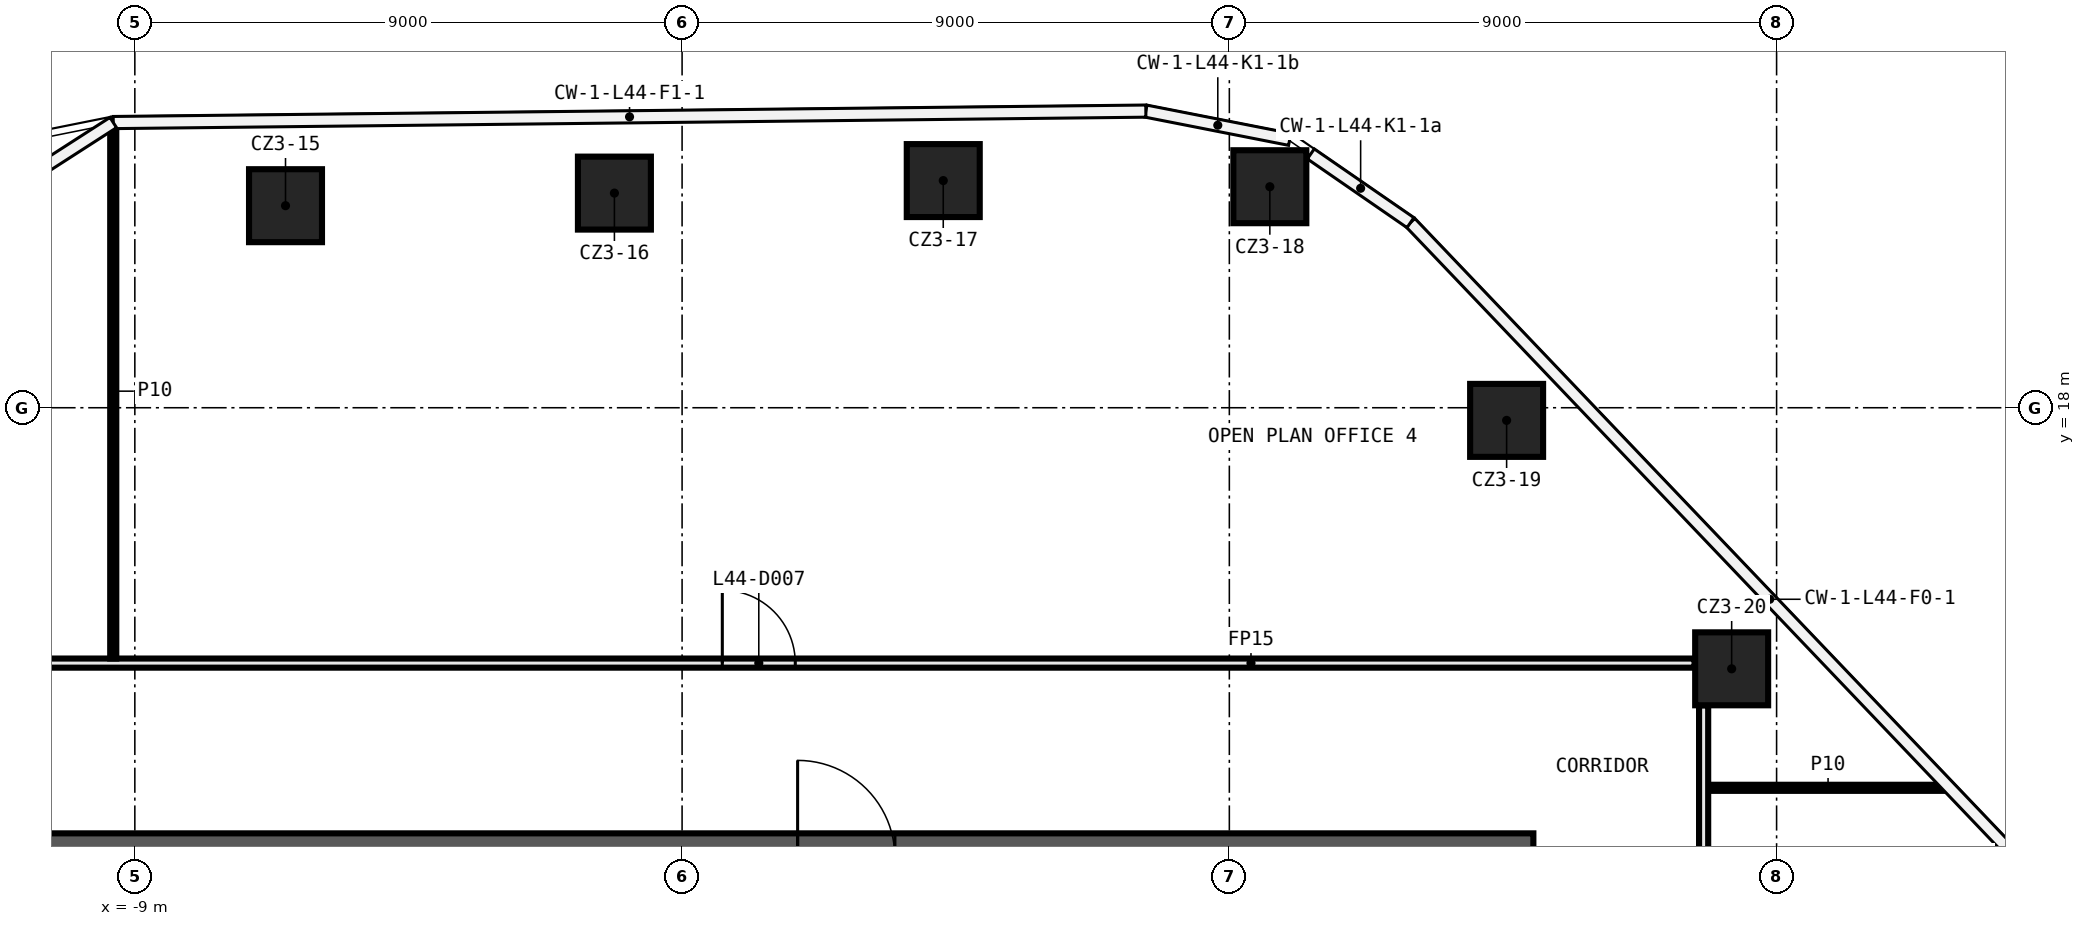
"""IFC4 building model, lengths in metres.
Left out: names, types, materials, properties, quantities, classifications, styles, units other than length and angle.
Written with IfcOpenShell. Run it as: python <this file> out.ifc"""

import sys

from ifc_helpers import new_model, si_unit, direction, frame, frame_2d, origin, origin_2d, place, context, subcontext, project, spatial, rectangle, extrude, element, fill, save


model = new_model("IFC4")
c1 = context("Model", 3, precision=1e-05, world=origin(), true_north=direction((0.0, 1.0)))
c2 = subcontext(c1, "Body", "Model", "MODEL_VIEW")
j1 = project(units=[si_unit("LENGTHUNIT", "METRE"), si_unit("PLANEANGLEUNIT", "RADIAN")], contexts=[c1])
p1 = place(None, origin())
s1 = spatial("IfcSite", under=j1, at=p1, CompositionType="ELEMENT")
p2 = place(p1, origin())
s2 = spatial("IfcBuilding", under=s1, at=p2, CompositionType="ELEMENT")
p3 = place(p2, frame((0.0, 0.0, 211.4)))
s3 = spatial("IfcBuildingStorey", under=s2, at=p3, CompositionType="ELEMENT", Elevation=211.4)
for number, where, z_axis, x_axis in (
    (1, (-6.522, 21.323, 0.0), (0.0, 0.0, 1.0), (1.0, 0.0, 0.0)),
    (2, (-1.113, 21.53, 0.0), (0.0, 0.0, 1.0), (1.0, 0.0, 0.0)),
    (3, (4.295, 21.736, 0.0), (0.0, 0.0, 1.0), (1.0, 0.0, 0.0)),
    (4, (9.666, 21.635, 0.0), (0.0, 0.0, 1.0), (1.0, 0.0, 0.0)),
    (5, (13.56, 17.792, 0.0), (0.0, 0.0, 1.0), (1.0, 0.0, 0.0)),
    (6, (17.261, 13.706, 0.0), (0.0, 0.0, 1.0), (1.0, 0.0, 0.0)),
):
    element("IfcColumn", number, at=place(p3, frame(where, z_axis=z_axis, x_axis=x_axis)), inside=s3, PredefinedType="COLUMN", context=c2, shape_type="SweptSolid", body=[
        extrude(rectangle(XDim=1.2, YDim=1.2, at=origin_2d()), origin(), (0.0, 0.0, 1.0), 3.82),
    ])
p4 = place(p3, frame((16.875, 11.749, 0.0), z_axis=(0.0, 0.0, 1.0), x_axis=(1.0, 0.0, 0.0)))
e7 = element("IfcWall", 7, at=p4, inside=s3, PredefinedType="PARTITIONING", context=c2, shape_type="SweptSolid", body=[
    extrude(rectangle(XDim=3.943, YDim=0.1, at=frame_2d((1.972, 0.0))), origin(), (0.0, 0.0, 1.0), 3.82),
])
p5 = place(p3, frame((-12.075, 13.8, 0.0), z_axis=(0.0, 0.0, 1.0), x_axis=(1.0, 0.0, 0.0)))
e8 = element("IfcWall", 8, at=p5, inside=s3, PredefinedType="PARTITIONING", context=c2, shape_type="SweptSolid", body=[
    extrude(rectangle(XDim=28.725, YDim=0.15, at=frame_2d((14.363, 0.0))), origin(), (0.0, 0.0, 1.0), 3.82),
])
p6 = place(p5, frame((12.737, 0.0, 0.0)))
e9 = element("IfcOpeningElement", 9, at=p6, cuts=e8, PredefinedType="OPENING", context=c2, shape_type="SweptSolid", body=[
    extrude(rectangle(XDim=1.2, YDim=2.1, at=frame_2d((0.6, 1.05))), frame((0.0, 0.085, 0.0), z_axis=(0.0, -1.0, 0.0), x_axis=(1.0, 0.0, 0.0)), (0.0, 0.0, 1.0), 0.17),
])
p7 = place(p3, frame((16.8, 13.106, 0.0), z_axis=(0.0, 0.0, 1.0), x_axis=(0.0, -1.0, 0.0)))
e10 = element("IfcWall", 10, at=p7, inside=s3, PredefinedType="PARTITIONING", context=c2, shape_type="SweptSolid", body=[
    extrude(rectangle(XDim=23.172, YDim=0.15, at=frame_2d((11.586, 0.0))), origin(), (0.0, 0.0, 1.0), 3.82),
])
p8 = place(p7, frame((20.579, 0.0, 0.0)))
e11 = element("IfcOpeningElement", 11, at=p8, cuts=e10, PredefinedType="OPENING", context=c2, shape_type="SweptSolid", body=[
    extrude(rectangle(XDim=1.2, YDim=2.1, at=frame_2d((0.6, 1.05))), frame((0.0, 0.085, 0.0), z_axis=(0.0, -1.0, 0.0), x_axis=(1.0, 0.0, 0.0)), (0.0, 0.0, 1.0), 0.17),
])
p9 = place(p7, frame((11.489, 0.0, 0.0)))
e12 = element("IfcOpeningElement", 12, at=p9, cuts=e10, PredefinedType="OPENING", context=c2, shape_type="SweptSolid", body=[
    extrude(rectangle(XDim=1.2, YDim=2.1, at=frame_2d((0.6, 1.05))), frame((0.0, 0.085, 0.0), z_axis=(0.0, -1.0, 0.0), x_axis=(1.0, 0.0, 0.0)), (0.0, 0.0, 1.0), 0.17),
])
p10 = place(p7, frame((6.039, 0.0, 0.0)))
e13 = element("IfcOpeningElement", 13, at=p10, cuts=e10, PredefinedType="OPENING", context=c2, shape_type="SweptSolid", body=[
    extrude(rectangle(XDim=1.2, YDim=2.1, at=frame_2d((0.6, 1.05))), frame((0.0, 0.085, 0.0), z_axis=(0.0, -1.0, 0.0), x_axis=(1.0, 0.0, 0.0)), (0.0, 0.0, 1.0), 0.17),
])
p11 = place(p3, frame((-9.355, 13.875, 0.0), z_axis=(0.0, 0.0, 1.0), x_axis=(0.0, 1.0, 0.0)))
e14 = element("IfcWall", 14, at=p11, inside=s3, PredefinedType="PARTITIONING", context=c2, shape_type="SweptSolid", body=[
    extrude(rectangle(XDim=8.795, YDim=0.1, at=frame_2d((4.397, 0.0))), origin(), (0.0, 0.0, 1.0), 3.82),
])
p12 = place(p3, frame((-14.0, 10.6, 0.0), z_axis=(0.0, 0.0, 1.0), x_axis=(1.0, 0.0, 0.0)))
e15 = element("IfcWall", 15, at=p12, inside=s3, PredefinedType="SHEAR", context=c2, shape_type="SweptSolid", body=[
    extrude(rectangle(XDim=28.0, YDim=0.8, at=frame_2d((14.0, 0.0))), origin(), (0.0, 0.0, 1.0), 3.82),
])
p13 = place(p12, frame((15.9, 0.0, 0.0)))
e16 = element("IfcOpeningElement", 16, at=p13, cuts=e15, PredefinedType="OPENING", context=c2, shape_type="SweptSolid", body=[
    extrude(rectangle(XDim=1.6, YDim=2.1, at=frame_2d((0.8, 1.05))), frame((0.0, 0.41, 0.0), z_axis=(0.0, -1.0, 0.0), x_axis=(1.0, 0.0, 0.0)), (0.0, 0.0, 1.0), 0.82),
])
p14 = place(p6, origin())
e17 = element("IfcDoor", 17, at=p14, inside=s3, OperationType="SINGLE_SWING_RIGHT", PredefinedType="DOOR", context=c2, shape_type="SweptSolid", body=[
    extrude(rectangle(XDim=1.2, YDim=2.1, at=frame_2d((0.6, 1.05))), frame((0.0, 0.025, 0.0), z_axis=(0.0, -1.0, 0.0), x_axis=(1.0, 0.0, 0.0)), (0.0, 0.0, 1.0), 0.05),
])
fill(e9, e17)
save(model, sys.argv[1])
